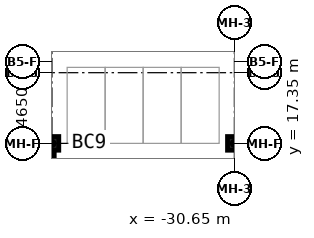
"""IFC4 building model, lengths in metres.
Left out: names, types, materials, properties, quantities, classifications, styles, units other than length and angle.
Written with IfcOpenShell. Run it as: python <this file> out.ifc"""

import sys

from ifc_helpers import new_model, si_unit, direction, frame, frame_2d, origin, origin_2d, place, context, subcontext, project, spatial, rectangle, extrude, source, transform, mapped, element, save


model = new_model("IFC4")
c1 = context("Model", 3, precision=1e-05, world=origin(), true_north=direction((0.0, 1.0)))
c2 = subcontext(c1, "Body", "Model", "MODEL_VIEW")
j1 = project(units=[si_unit("LENGTHUNIT", "METRE"), si_unit("PLANEANGLEUNIT", "RADIAN")], contexts=[c1])
p1 = place(None, origin())
s1 = spatial("IfcSite", under=j1, at=p1, CompositionType="ELEMENT")
p2 = place(p1, origin())
s2 = spatial("IfcBuilding", under=s1, at=p2, CompositionType="ELEMENT")
p3 = place(p2, frame((0.0, 0.0, -4.5)))
s3 = spatial("IfcBuildingStorey", under=s2, at=p3, CompositionType="ELEMENT", Elevation=-4.5)
m1 = source(origin(), c2, "Body", "SweptSolid", [
    extrude(rectangle(XDim=11.1, YDim=0.3, at=frame_2d((5.55, 0.0))), origin(), (0.0, 0.0, 1.0), 4.09),
])
p4 = place(p3, frame((-42.65, 5.8, 0.0), z_axis=(0.0, 0.0, 1.0), x_axis=(0.0, 1.0, 0.0)))
e1 = element("IfcWall", 1, at=p4, inside=s3, PredefinedType="SHEAR", context=c2, shape_type="MappedRepresentation", body=[
    mapped(m1, transform((0.0, 0.0, 0.0))),
])
m2 = source(origin(), c2, "Body", "SweptSolid", [
    extrude(rectangle(XDim=0.9, YDim=0.9, at=origin_2d()), origin(), (0.0, 0.0, 1.0), 4.5),
])
for number, where, z_axis, x_axis in (
    (2, (-42.65, 17.35, 0.0), (0.0, 0.0, 1.0), (1.0, 0.0, 0.0)),
    (3, (-30.65, 17.35, 0.0), (0.0, 0.0, 1.0), (1.0, 0.0, 0.0)),
):
    element("IfcColumn", number, at=place(p3, frame(where, z_axis=z_axis, x_axis=x_axis)), inside=s3, PredefinedType="COLUMN", context=c2, shape_type="MappedRepresentation", body=[
        mapped(m2, transform((0.0, 0.0, 0.0))),
    ])
save(model, sys.argv[1])
